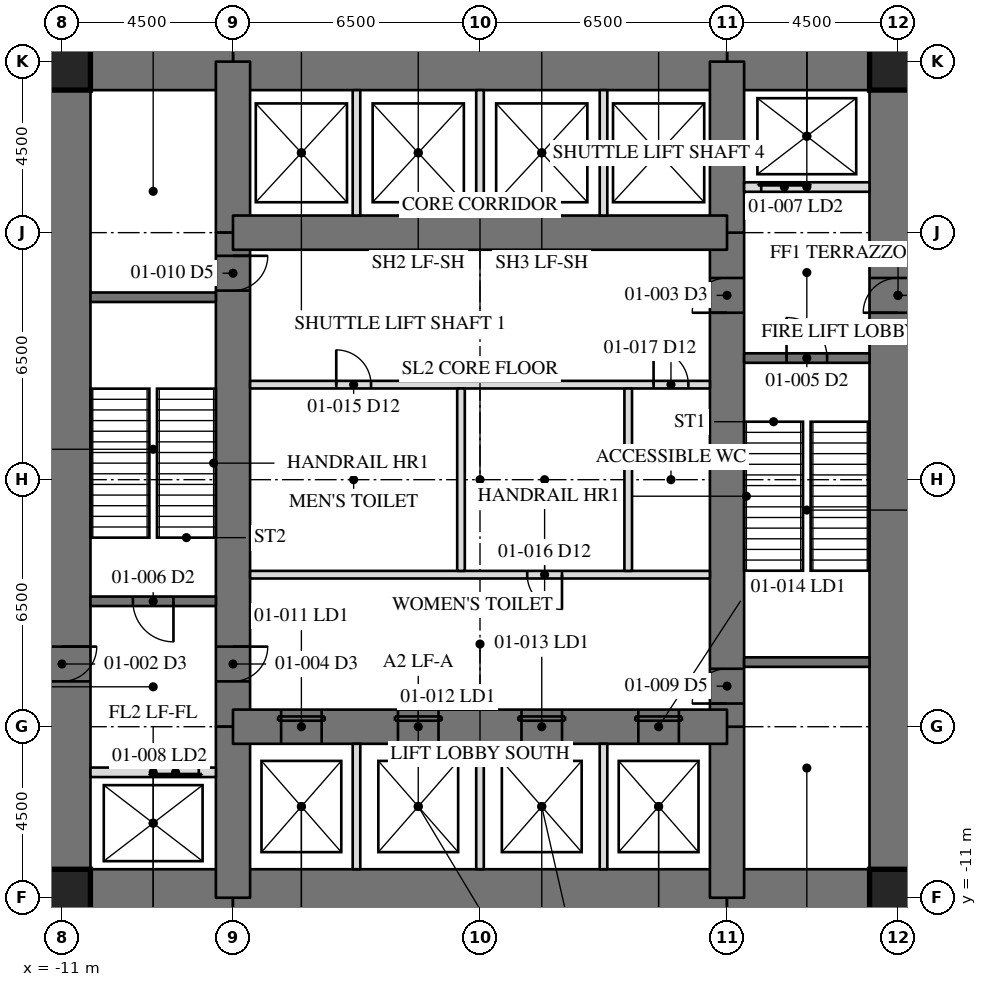
"""IFC4 building model, lengths in metres.
Left out: names, types, materials, properties, quantities, classifications, styles, units other than length and angle.
Written with IfcOpenShell. Run it as: python <this file> out.ifc"""

import sys

from ifc_helpers import new_model, si_unit, direction, frame, frame_2d, origin, origin_2d, place, context, subcontext, project, spatial, rectangle, hollow_rectangle, extrude, element, fill, save


model = new_model("IFC4")
c1 = context("Model", 3, precision=1e-05, world=origin(), true_north=direction((0.0, 1.0)))
c2 = subcontext(c1, "Body", "Model", "MODEL_VIEW")
j1 = project(units=[si_unit("LENGTHUNIT", "METRE"), si_unit("PLANEANGLEUNIT", "RADIAN")], contexts=[c1])
p1 = place(None, origin())
s1 = spatial("IfcSite", under=j1, at=p1, CompositionType="ELEMENT")
p2 = place(p1, origin())
s2 = spatial("IfcBuilding", under=s1, at=p2, CompositionType="ELEMENT")
p3 = place(p2, frame((0.0, 0.0, 6.0)))
s3 = spatial("IfcBuildingStorey", under=s2, at=p3, CompositionType="ELEMENT", Elevation=6.0)
p4 = place(p3, frame((11.0, -11.0, 0.0), z_axis=(0.0, 0.0, 1.0), x_axis=(0.0, 1.0, 0.0)))
e1 = element("IfcWall", 1, at=p4, inside=s3, PredefinedType="SHEAR", context=c2, shape_type="SweptSolid", body=[
    extrude(rectangle(XDim=22.0, YDim=1.5, at=frame_2d((11.0, 0.0))), origin(), (0.0, 0.0, 1.0), 5.0),
])
p5 = place(p4, frame((15.393, 0.0, 0.0)))
e2 = element("IfcOpeningElement", 2, at=p5, cuts=e1, PredefinedType="OPENING", context=c2, shape_type="SweptSolid", body=[
    extrude(rectangle(XDim=0.915, YDim=2.134, at=frame_2d((0.458, 1.067))), frame((0.0, 0.76, 0.0), z_axis=(0.0, -1.0, 0.0), x_axis=(1.0, 0.0, 0.0)), (0.0, 0.0, 1.0), 1.52),
])
p6 = place(p3, frame((-11.0, 11.0, 0.0), z_axis=(0.0, 0.0, 1.0), x_axis=(0.0, -1.0, 0.0)))
e3 = element("IfcWall", 3, at=p6, inside=s3, PredefinedType="SHEAR", context=c2, shape_type="SweptSolid", body=[
    extrude(rectangle(XDim=22.0, YDim=1.5, at=frame_2d((11.0, 0.0))), origin(), (0.0, 0.0, 1.0), 5.0),
])
p7 = place(p6, frame((15.393, 0.0, 0.0)))
e4 = element("IfcOpeningElement", 4, at=p7, cuts=e3, PredefinedType="OPENING", context=c2, shape_type="SweptSolid", body=[
    extrude(rectangle(XDim=0.915, YDim=2.134, at=frame_2d((0.458, 1.067))), frame((0.0, 0.76, 0.0), z_axis=(0.0, -1.0, 0.0), x_axis=(1.0, 0.0, 0.0)), (0.0, 0.0, 1.0), 1.52),
])
p8 = place(p3, frame((11.0, 11.0, 0.0), z_axis=(0.0, 0.0, 1.0), x_axis=(-1.0, 0.0, 0.0)))
e5 = element("IfcWall", 5, at=p8, inside=s3, PredefinedType="SHEAR", context=c2, shape_type="SweptSolid", body=[
    extrude(rectangle(XDim=4.5, YDim=1.5, at=frame_2d((2.25, 0.0))), origin(), (0.0, 0.0, 1.0), 5.0),
])
p9 = place(p3, frame((6.5, 11.0, 0.0), z_axis=(0.0, 0.0, 1.0), x_axis=(-1.0, 0.0, 0.0)))
e6 = element("IfcWall", 6, at=p9, inside=s3, PredefinedType="SHEAR", context=c2, shape_type="SweptSolid", body=[
    extrude(rectangle(XDim=13.0, YDim=1.5, at=frame_2d((6.5, 0.0))), origin(), (0.0, 0.0, 1.0), 5.0),
])
for number, where, z_axis, x_axis in (
    (7, (-6.5, 11.0, 0.0), (0.0, 0.0, 1.0), (-1.0, 0.0, 0.0)),
    (8, (-11.0, -11.0, 0.0), (0.0, 0.0, 1.0), (1.0, 0.0, 0.0)),
):
    element("IfcWall", number, at=place(p3, frame(where, z_axis=z_axis, x_axis=x_axis)), inside=s3, PredefinedType="SHEAR", context=c2, shape_type="SweptSolid", body=[
        extrude(rectangle(XDim=4.5, YDim=1.5, at=frame_2d((2.25, 0.0))), origin(), (0.0, 0.0, 1.0), 5.0),
    ])
p10 = place(p3, frame((-6.5, -11.0, 0.0), z_axis=(0.0, 0.0, 1.0), x_axis=(1.0, 0.0, 0.0)))
e9 = element("IfcWall", 9, at=p10, inside=s3, PredefinedType="SHEAR", context=c2, shape_type="SweptSolid", body=[
    extrude(rectangle(XDim=13.0, YDim=1.5, at=frame_2d((6.5, 0.0))), origin(), (0.0, 0.0, 1.0), 5.0),
])
p11 = place(p3, frame((6.5, -11.0, 0.0), z_axis=(0.0, 0.0, 1.0), x_axis=(1.0, 0.0, 0.0)))
e10 = element("IfcWall", 10, at=p11, inside=s3, PredefinedType="SHEAR", context=c2, shape_type="SweptSolid", body=[
    extrude(rectangle(XDim=4.5, YDim=1.5, at=frame_2d((2.25, 0.0))), origin(), (0.0, 0.0, 1.0), 5.0),
])
p12 = place(p3, frame((6.5, -11.0, 0.0), z_axis=(0.0, 0.0, 1.0), x_axis=(0.0, 1.0, 0.0)))
e11 = element("IfcWall", 11, at=p12, inside=s3, PredefinedType="SHEAR", context=c2, shape_type="SweptSolid", body=[
    extrude(rectangle(XDim=4.5, YDim=0.9, at=frame_2d((2.25, 0.0))), origin(), (0.0, 0.0, 1.0), 5.0),
])
p13 = place(p3, frame((6.5, -6.5, 0.0), z_axis=(0.0, 0.0, 1.0), x_axis=(0.0, 1.0, 0.0)))
e12 = element("IfcWall", 12, at=p13, inside=s3, PredefinedType="SHEAR", context=c2, shape_type="SweptSolid", body=[
    extrude(rectangle(XDim=13.0, YDim=0.9, at=frame_2d((6.5, 0.0))), origin(), (0.0, 0.0, 1.0), 5.0),
])
p14 = place(p13, frame((10.893, 0.0, 0.0)))
e13 = element("IfcOpeningElement", 13, at=p14, cuts=e12, PredefinedType="OPENING", context=c2, shape_type="SweptSolid", body=[
    extrude(rectangle(XDim=0.915, YDim=2.134, at=frame_2d((0.458, 1.067))), frame((0.0, 0.46, 0.0), z_axis=(0.0, -1.0, 0.0), x_axis=(1.0, 0.0, 0.0)), (0.0, 0.0, 1.0), 0.92),
])
p15 = place(p13, frame((0.61, 0.0, 0.0)))
e14 = element("IfcOpeningElement", 14, at=p15, cuts=e12, PredefinedType="OPENING", context=c2, shape_type="SweptSolid", body=[
    extrude(rectangle(XDim=0.915, YDim=2.134, at=frame_2d((0.458, 1.067))), frame((0.0, 0.46, 0.0), z_axis=(0.0, -1.0, 0.0), x_axis=(1.0, 0.0, 0.0)), (0.0, 0.0, 1.0), 0.92),
])
for number, where, z_axis, x_axis in (
    (15, (6.5, 6.5, 0.0), (0.0, 0.0, 1.0), (0.0, 1.0, 0.0)),
    (16, (-6.5, 11.0, 0.0), (0.0, 0.0, 1.0), (0.0, -1.0, 0.0)),
):
    element("IfcWall", number, at=place(p3, frame(where, z_axis=z_axis, x_axis=x_axis)), inside=s3, PredefinedType="SHEAR", context=c2, shape_type="SweptSolid", body=[
        extrude(rectangle(XDim=4.5, YDim=0.9, at=frame_2d((2.25, 0.0))), origin(), (0.0, 0.0, 1.0), 5.0),
    ])
p16 = place(p3, frame((-6.5, 6.5, 0.0), z_axis=(0.0, 0.0, 1.0), x_axis=(0.0, -1.0, 0.0)))
e17 = element("IfcWall", 17, at=p16, inside=s3, PredefinedType="SHEAR", context=c2, shape_type="SweptSolid", body=[
    extrude(rectangle(XDim=13.0, YDim=0.9, at=frame_2d((6.5, 0.0))), origin(), (0.0, 0.0, 1.0), 5.0),
])
p17 = place(p16, frame((10.893, 0.0, 0.0)))
e18 = element("IfcOpeningElement", 18, at=p17, cuts=e17, PredefinedType="OPENING", context=c2, shape_type="SweptSolid", body=[
    extrude(rectangle(XDim=0.915, YDim=2.134, at=frame_2d((0.458, 1.067))), frame((0.0, 0.46, 0.0), z_axis=(0.0, -1.0, 0.0), x_axis=(1.0, 0.0, 0.0)), (0.0, 0.0, 1.0), 0.92),
])
p18 = place(p16, frame((0.61, 0.0, 0.0)))
e19 = element("IfcOpeningElement", 19, at=p18, cuts=e17, PredefinedType="OPENING", context=c2, shape_type="SweptSolid", body=[
    extrude(rectangle(XDim=0.915, YDim=2.134, at=frame_2d((0.458, 1.067))), frame((0.0, 0.46, 0.0), z_axis=(0.0, -1.0, 0.0), x_axis=(1.0, 0.0, 0.0)), (0.0, 0.0, 1.0), 0.92),
])
p19 = place(p3, frame((-6.5, -6.5, 0.0), z_axis=(0.0, 0.0, 1.0), x_axis=(0.0, -1.0, 0.0)))
e20 = element("IfcWall", 20, at=p19, inside=s3, PredefinedType="SHEAR", context=c2, shape_type="SweptSolid", body=[
    extrude(rectangle(XDim=4.5, YDim=0.9, at=frame_2d((2.25, 0.0))), origin(), (0.0, 0.0, 1.0), 5.0),
])
p20 = place(p3, frame((6.5, 6.5, 0.0), z_axis=(0.0, 0.0, 1.0), x_axis=(-1.0, 0.0, 0.0)))
e21 = element("IfcWall", 21, at=p20, inside=s3, PredefinedType="SHEAR", context=c2, shape_type="SweptSolid", body=[
    extrude(rectangle(XDim=13.0, YDim=0.9, at=frame_2d((6.5, 0.0))), origin(), (0.0, 0.0, 1.0), 5.0),
])
p21 = place(p3, frame((-6.5, -6.5, 0.0), z_axis=(0.0, 0.0, 1.0), x_axis=(1.0, 0.0, 0.0)))
e22 = element("IfcWall", 22, at=p21, inside=s3, PredefinedType="SHEAR", context=c2, shape_type="SweptSolid", body=[
    extrude(rectangle(XDim=13.0, YDim=0.9, at=frame_2d((6.5, 0.0))), origin(), (0.0, 0.0, 1.0), 5.0),
])
p22 = place(p21, frame((1.267, 0.0, 0.0)))
e23 = element("IfcOpeningElement", 23, at=p22, cuts=e22, PredefinedType="OPENING", context=c2, shape_type="SweptSolid", body=[
    extrude(rectangle(XDim=1.067, YDim=2.134, at=frame_2d((0.533, 1.067))), frame((0.0, 0.46, 0.0), z_axis=(0.0, -1.0, 0.0), x_axis=(1.0, 0.0, 0.0)), (0.0, 0.0, 1.0), 0.92),
])
p23 = place(p21, frame((4.342, 0.0, 0.0)))
e24 = element("IfcOpeningElement", 24, at=p23, cuts=e22, PredefinedType="OPENING", context=c2, shape_type="SweptSolid", body=[
    extrude(rectangle(XDim=1.067, YDim=2.134, at=frame_2d((0.533, 1.067))), frame((0.0, 0.46, 0.0), z_axis=(0.0, -1.0, 0.0), x_axis=(1.0, 0.0, 0.0)), (0.0, 0.0, 1.0), 0.92),
])
p24 = place(p21, frame((7.592, 0.0, 0.0)))
e25 = element("IfcOpeningElement", 25, at=p24, cuts=e22, PredefinedType="OPENING", context=c2, shape_type="SweptSolid", body=[
    extrude(rectangle(XDim=1.067, YDim=2.134, at=frame_2d((0.533, 1.067))), frame((0.0, 0.46, 0.0), z_axis=(0.0, -1.0, 0.0), x_axis=(1.0, 0.0, 0.0)), (0.0, 0.0, 1.0), 0.92),
])
p25 = place(p21, frame((10.667, 0.0, 0.0)))
e26 = element("IfcOpeningElement", 26, at=p25, cuts=e22, PredefinedType="OPENING", context=c2, shape_type="SweptSolid", body=[
    extrude(rectangle(XDim=1.067, YDim=2.134, at=frame_2d((0.533, 1.067))), frame((0.0, 0.46, 0.0), z_axis=(0.0, -1.0, 0.0), x_axis=(1.0, 0.0, 0.0)), (0.0, 0.0, 1.0), 0.92),
])
for number, where, z_axis, x_axis in (
    (27, (11.0, 11.0, 0.0), (0.0, 0.0, 1.0), (1.0, 0.0, 0.0)),
    (28, (-11.0, 11.0, 0.0), (0.0, 0.0, 1.0), (1.0, 0.0, 0.0)),
    (29, (-11.0, -11.0, 0.0), (0.0, 0.0, 1.0), (1.0, 0.0, 0.0)),
    (30, (11.0, -11.0, 0.0), (0.0, 0.0, 1.0), (1.0, 0.0, 0.0)),
):
    element("IfcColumn", number, at=place(p3, frame(where, z_axis=z_axis, x_axis=x_axis)), inside=s3, PredefinedType="COLUMN", context=c2, shape_type="SweptSolid", body=[
        extrude(hollow_rectangle(XDim=1.499, YDim=1.499, WallThickness=0.102, at=origin_2d()), origin(), (0.0, 0.0, 1.0), 5.0),
    ])
for number, where, z_axis, x_axis in (
    (31, (6.95, -4.8, 0.0), (0.0, 0.0, 1.0), (1.0, 0.0, 0.0)),
    (32, (-6.95, 4.8, 0.0), (0.0, 0.0, 1.0), (-1.0, 0.0, 0.0)),
):
    element("IfcWall", number, at=place(p3, frame(where, z_axis=z_axis, x_axis=x_axis)), inside=s3, PredefinedType="SOLIDWALL", context=c2, shape_type="SweptSolid", body=[
        extrude(rectangle(XDim=3.3, YDim=0.25, at=frame_2d((1.65, 0.0))), origin(), (0.0, 0.0, 1.0), 4.81),
    ])
p26 = place(p3, frame((6.95, 3.2, 0.0), z_axis=(0.0, 0.0, 1.0), x_axis=(1.0, 0.0, 0.0)))
e33 = element("IfcWall", 33, at=p26, inside=s3, PredefinedType="SOLIDWALL", context=c2, shape_type="SweptSolid", body=[
    extrude(rectangle(XDim=3.3, YDim=0.25, at=frame_2d((1.65, 0.0))), origin(), (0.0, 0.0, 1.0), 4.81),
])
p27 = place(p26, frame((1.116, 0.0, 0.0)))
e34 = element("IfcOpeningElement", 34, at=p27, cuts=e33, PredefinedType="OPENING", context=c2, shape_type="SweptSolid", body=[
    extrude(rectangle(XDim=1.067, YDim=2.134, at=frame_2d((0.533, 1.067))), frame((0.0, 0.135, 0.0), z_axis=(0.0, -1.0, 0.0), x_axis=(1.0, 0.0, 0.0)), (0.0, 0.0, 1.0), 0.27),
])
p28 = place(p3, frame((-6.95, -3.2, 0.0), z_axis=(0.0, 0.0, 1.0), x_axis=(-1.0, 0.0, 0.0)))
e35 = element("IfcWall", 35, at=p28, inside=s3, PredefinedType="SOLIDWALL", context=c2, shape_type="SweptSolid", body=[
    extrude(rectangle(XDim=3.3, YDim=0.25, at=frame_2d((1.65, 0.0))), origin(), (0.0, 0.0, 1.0), 4.81),
])
p29 = place(p28, frame((1.116, 0.0, 0.0)))
e36 = element("IfcOpeningElement", 36, at=p29, cuts=e35, PredefinedType="OPENING", context=c2, shape_type="SweptSolid", body=[
    extrude(rectangle(XDim=1.067, YDim=2.134, at=frame_2d((0.533, 1.067))), frame((0.0, 0.135, 0.0), z_axis=(0.0, -1.0, 0.0), x_axis=(1.0, 0.0, 0.0)), (0.0, 0.0, 1.0), 0.27),
])
p30 = place(p3, frame((6.95, 7.7, 0.0), z_axis=(0.0, 0.0, 1.0), x_axis=(1.0, 0.0, 0.0)))
e37 = element("IfcWall", 37, at=p30, inside=s3, PredefinedType="PARTITIONING", context=c2, shape_type="SweptSolid", body=[
    extrude(rectangle(XDim=3.3, YDim=0.25, at=frame_2d((1.65, 0.0))), origin(), (0.0, 0.0, 1.0), 4.81),
])
p31 = place(p30, frame((0.45, 0.0, 0.0)))
e38 = element("IfcOpeningElement", 38, at=p31, cuts=e37, PredefinedType="OPENING", context=c2, shape_type="SweptSolid", body=[
    extrude(rectangle(XDim=1.219, YDim=2.134, at=frame_2d((0.609, 1.067))), frame((0.0, 0.135, 0.0), z_axis=(0.0, -1.0, 0.0), x_axis=(1.0, 0.0, 0.0)), (0.0, 0.0, 1.0), 0.27),
])
p32 = place(p3, frame((-6.95, -7.7, 0.0), z_axis=(0.0, 0.0, 1.0), x_axis=(-1.0, 0.0, 0.0)))
e39 = element("IfcWall", 39, at=p32, inside=s3, PredefinedType="PARTITIONING", context=c2, shape_type="SweptSolid", body=[
    extrude(rectangle(XDim=3.3, YDim=0.25, at=frame_2d((1.65, 0.0))), origin(), (0.0, 0.0, 1.0), 4.81),
])
p33 = place(p32, frame((0.45, 0.0, 0.0)))
e40 = element("IfcOpeningElement", 40, at=p33, cuts=e39, PredefinedType="OPENING", context=c2, shape_type="SweptSolid", body=[
    extrude(rectangle(XDim=1.219, YDim=2.134, at=frame_2d((0.609, 1.067))), frame((0.0, 0.135, 0.0), z_axis=(0.0, -1.0, 0.0), x_axis=(1.0, 0.0, 0.0)), (0.0, 0.0, 1.0), 0.27),
])
p34 = place(p3, frame((-6.05, 2.5, 0.0), z_axis=(0.0, 0.0, 1.0), x_axis=(1.0, 0.0, 0.0)))
e41 = element("IfcWall", 41, at=p34, inside=s3, PredefinedType="PARTITIONING", context=c2, shape_type="SweptSolid", body=[
    extrude(rectangle(XDim=12.1, YDim=0.2, at=frame_2d((6.05, 0.0))), origin(), (0.0, 0.0, 1.0), 4.81),
])
p35 = place(p34, frame((2.268, 0.0, 0.0)))
e42 = element("IfcOpeningElement", 42, at=p35, cuts=e41, PredefinedType="OPENING", context=c2, shape_type="SweptSolid", body=[
    extrude(rectangle(XDim=0.915, YDim=2.134, at=frame_2d((0.458, 1.067))), frame((0.0, 0.11, 0.0), z_axis=(0.0, -1.0, 0.0), x_axis=(1.0, 0.0, 0.0)), (0.0, 0.0, 1.0), 0.22),
])
p36 = place(p34, frame((10.617, 0.0, 0.0)))
e43 = element("IfcOpeningElement", 43, at=p36, cuts=e41, PredefinedType="OPENING", context=c2, shape_type="SweptSolid", body=[
    extrude(rectangle(XDim=0.915, YDim=2.134, at=frame_2d((0.458, 1.067))), frame((0.0, 0.11, 0.0), z_axis=(0.0, -1.0, 0.0), x_axis=(1.0, 0.0, 0.0)), (0.0, 0.0, 1.0), 0.22),
])
p37 = place(p3, frame((6.05, -2.5, 0.0), z_axis=(0.0, 0.0, 1.0), x_axis=(-1.0, 0.0, 0.0)))
e44 = element("IfcWall", 44, at=p37, inside=s3, PredefinedType="PARTITIONING", context=c2, shape_type="SweptSolid", body=[
    extrude(rectangle(XDim=12.1, YDim=0.2, at=frame_2d((6.05, 0.0))), origin(), (0.0, 0.0, 1.0), 4.81),
])
p38 = place(p37, frame((3.893, 0.0, 0.0)))
e45 = element("IfcOpeningElement", 45, at=p38, cuts=e44, PredefinedType="OPENING", context=c2, shape_type="SweptSolid", body=[
    extrude(rectangle(XDim=0.915, YDim=2.134, at=frame_2d((0.458, 1.067))), frame((0.0, 0.11, 0.0), z_axis=(0.0, -1.0, 0.0), x_axis=(1.0, 0.0, 0.0)), (0.0, 0.0, 1.0), 0.22),
])
for number, where, z_axis, x_axis in (
    (46, (-3.25, 6.95, 0.0), (0.0, 0.0, 1.0), (0.0, 1.0, 0.0)),
    (47, (0.0, 6.95, 0.0), (0.0, 0.0, 1.0), (0.0, 1.0, 0.0)),
    (48, (3.25, 6.95, 0.0), (0.0, 0.0, 1.0), (0.0, 1.0, 0.0)),
    (49, (-3.25, -10.25, 0.0), (0.0, 0.0, 1.0), (0.0, 1.0, 0.0)),
    (50, (0.0, -10.25, 0.0), (0.0, 0.0, 1.0), (0.0, 1.0, 0.0)),
    (51, (3.25, -10.25, 0.0), (0.0, 0.0, 1.0), (0.0, 1.0, 0.0)),
):
    element("IfcWall", number, at=place(p3, frame(where, z_axis=z_axis, x_axis=x_axis)), inside=s3, PredefinedType="PARTITIONING", context=c2, shape_type="SweptSolid", body=[
        extrude(rectangle(XDim=3.3, YDim=0.2, at=frame_2d((1.65, 0.0))), origin(), (0.0, 0.0, 1.0), 4.81),
    ])
for number, where, z_axis, x_axis in (
    (52, (-0.5, -2.4, 0.0), (0.0, 0.0, 1.0), (0.0, 1.0, 0.0)),
    (53, (3.9, -2.4, 0.0), (0.0, 0.0, 1.0), (0.0, 1.0, 0.0)),
):
    element("IfcWall", number, at=place(p3, frame(where, z_axis=z_axis, x_axis=x_axis)), inside=s3, PredefinedType="PARTITIONING", context=c2, shape_type="SweptSolid", body=[
        extrude(rectangle(XDim=4.8, YDim=0.2, at=frame_2d((2.4, 0.0))), origin(), (0.0, 0.0, 1.0), 4.81),
    ])
p39 = place(p14, origin())
e54 = element("IfcDoor", 54, at=p39, inside=s3, OperationType="SINGLE_SWING_RIGHT", PredefinedType="DOOR", context=c2, shape_type="SweptSolid", body=[
    extrude(rectangle(XDim=0.915, YDim=2.134, at=frame_2d((0.458, 1.067))), frame((0.0, -0.375, 0.0), z_axis=(0.0, -1.0, 0.0), x_axis=(1.0, 0.0, 0.0)), (0.0, 0.0, 1.0), 0.05),
])
fill(e13, e54)
p40 = place(p17, origin())
e55 = element("IfcDoor", 55, at=p40, inside=s3, OperationType="SINGLE_SWING_RIGHT", PredefinedType="DOOR", context=c2, shape_type="SweptSolid", body=[
    extrude(rectangle(XDim=0.915, YDim=2.134, at=frame_2d((0.458, 1.067))), frame((0.0, -0.375, 0.0), z_axis=(0.0, -1.0, 0.0), x_axis=(1.0, 0.0, 0.0)), (0.0, 0.0, 1.0), 0.05),
])
fill(e18, e55)
p41 = place(p27, origin())
e56 = element("IfcDoor", 56, at=p41, inside=s3, OperationType="SINGLE_SWING_LEFT", PredefinedType="DOOR", context=c2, shape_type="SweptSolid", body=[
    extrude(rectangle(XDim=1.067, YDim=2.134, at=frame_2d((0.533, 1.067))), frame((0.0, 0.025, 0.0), z_axis=(0.0, -1.0, 0.0), x_axis=(1.0, 0.0, 0.0)), (0.0, 0.0, 1.0), 0.05),
])
fill(e34, e56)
p42 = place(p29, origin())
e57 = element("IfcDoor", 57, at=p42, inside=s3, OperationType="SINGLE_SWING_LEFT", PredefinedType="DOOR", context=c2, shape_type="SweptSolid", body=[
    extrude(rectangle(XDim=1.067, YDim=2.134, at=frame_2d((0.533, 1.067))), frame((0.0, 0.025, 0.0), z_axis=(0.0, -1.0, 0.0), x_axis=(1.0, 0.0, 0.0)), (0.0, 0.0, 1.0), 0.05),
])
fill(e36, e57)
p43 = place(p31, origin())
e58 = element("IfcDoor", 58, at=p43, inside=s3, OperationType="SLIDING_TO_LEFT", PredefinedType="DOOR", context=c2, shape_type="SweptSolid", body=[
    extrude(rectangle(XDim=1.219, YDim=2.134, at=frame_2d((0.609, 1.067))), frame((0.0, 0.025, 0.0), z_axis=(0.0, -1.0, 0.0), x_axis=(1.0, 0.0, 0.0)), (0.0, 0.0, 1.0), 0.05),
])
fill(e38, e58)
p44 = place(p33, origin())
e59 = element("IfcDoor", 59, at=p44, inside=s3, OperationType="SLIDING_TO_LEFT", PredefinedType="DOOR", context=c2, shape_type="SweptSolid", body=[
    extrude(rectangle(XDim=1.219, YDim=2.134, at=frame_2d((0.609, 1.067))), frame((0.0, 0.025, 0.0), z_axis=(0.0, -1.0, 0.0), x_axis=(1.0, 0.0, 0.0)), (0.0, 0.0, 1.0), 0.05),
])
fill(e40, e59)
p45 = place(p15, origin())
e60 = element("IfcDoor", 60, at=p45, inside=s3, OperationType="SINGLE_SWING_RIGHT", PredefinedType="DOOR", context=c2, shape_type="SweptSolid", body=[
    extrude(rectangle(XDim=0.915, YDim=2.134, at=frame_2d((0.458, 1.067))), frame((0.0, -0.375, 0.0), z_axis=(0.0, -1.0, 0.0), x_axis=(1.0, 0.0, 0.0)), (0.0, 0.0, 1.0), 0.05),
])
fill(e14, e60)
p46 = place(p18, origin())
e61 = element("IfcDoor", 61, at=p46, inside=s3, OperationType="SINGLE_SWING_RIGHT", PredefinedType="DOOR", context=c2, shape_type="SweptSolid", body=[
    extrude(rectangle(XDim=0.915, YDim=2.134, at=frame_2d((0.458, 1.067))), frame((0.0, -0.375, 0.0), z_axis=(0.0, -1.0, 0.0), x_axis=(1.0, 0.0, 0.0)), (0.0, 0.0, 1.0), 0.05),
])
fill(e19, e61)
p47 = place(p22, origin())
e62 = element("IfcDoor", 62, at=p47, inside=s3, OperationType="SLIDING_TO_LEFT", PredefinedType="DOOR", context=c2, shape_type="SweptSolid", body=[
    extrude(rectangle(XDim=1.067, YDim=2.134, at=frame_2d((0.533, 1.067))), frame((0.0, -0.375, 0.0), z_axis=(0.0, -1.0, 0.0), x_axis=(1.0, 0.0, 0.0)), (0.0, 0.0, 1.0), 0.05),
])
fill(e23, e62)
p48 = place(p23, origin())
e63 = element("IfcDoor", 63, at=p48, inside=s3, OperationType="SLIDING_TO_LEFT", PredefinedType="DOOR", context=c2, shape_type="SweptSolid", body=[
    extrude(rectangle(XDim=1.067, YDim=2.134, at=frame_2d((0.533, 1.067))), frame((0.0, -0.375, 0.0), z_axis=(0.0, -1.0, 0.0), x_axis=(1.0, 0.0, 0.0)), (0.0, 0.0, 1.0), 0.05),
])
fill(e24, e63)
p49 = place(p24, origin())
e64 = element("IfcDoor", 64, at=p49, inside=s3, OperationType="SLIDING_TO_LEFT", PredefinedType="DOOR", context=c2, shape_type="SweptSolid", body=[
    extrude(rectangle(XDim=1.067, YDim=2.134, at=frame_2d((0.533, 1.067))), frame((0.0, -0.375, 0.0), z_axis=(0.0, -1.0, 0.0), x_axis=(1.0, 0.0, 0.0)), (0.0, 0.0, 1.0), 0.05),
])
fill(e25, e64)
p50 = place(p25, origin())
e65 = element("IfcDoor", 65, at=p50, inside=s3, OperationType="SLIDING_TO_LEFT", PredefinedType="DOOR", context=c2, shape_type="SweptSolid", body=[
    extrude(rectangle(XDim=1.067, YDim=2.134, at=frame_2d((0.533, 1.067))), frame((0.0, -0.375, 0.0), z_axis=(0.0, -1.0, 0.0), x_axis=(1.0, 0.0, 0.0)), (0.0, 0.0, 1.0), 0.05),
])
fill(e26, e65)
p51 = place(p35, origin())
e66 = element("IfcDoor", 66, at=p51, inside=s3, OperationType="SINGLE_SWING_LEFT", PredefinedType="DOOR", context=c2, shape_type="SweptSolid", body=[
    extrude(rectangle(XDim=0.915, YDim=2.134, at=frame_2d((0.458, 1.067))), frame((0.0, 0.025, 0.0), z_axis=(0.0, -1.0, 0.0), x_axis=(1.0, 0.0, 0.0)), (0.0, 0.0, 1.0), 0.05),
])
fill(e42, e66)
p52 = place(p38, origin())
e67 = element("IfcDoor", 67, at=p52, inside=s3, OperationType="SINGLE_SWING_LEFT", PredefinedType="DOOR", context=c2, shape_type="SweptSolid", body=[
    extrude(rectangle(XDim=0.915, YDim=2.134, at=frame_2d((0.458, 1.067))), frame((0.0, 0.025, 0.0), z_axis=(0.0, -1.0, 0.0), x_axis=(1.0, 0.0, 0.0)), (0.0, 0.0, 1.0), 0.05),
])
fill(e45, e67)
p53 = place(p36, origin())
e68 = element("IfcDoor", 68, at=p53, inside=s3, OperationType="SINGLE_SWING_LEFT", PredefinedType="DOOR", context=c2, shape_type="SweptSolid", body=[
    extrude(rectangle(XDim=0.915, YDim=2.134, at=frame_2d((0.458, 1.067))), frame((0.0, 0.025, 0.0), z_axis=(0.0, -1.0, 0.0), x_axis=(1.0, 0.0, 0.0)), (0.0, 0.0, 1.0), 0.05),
])
fill(e43, e68)
save(model, sys.argv[1])
